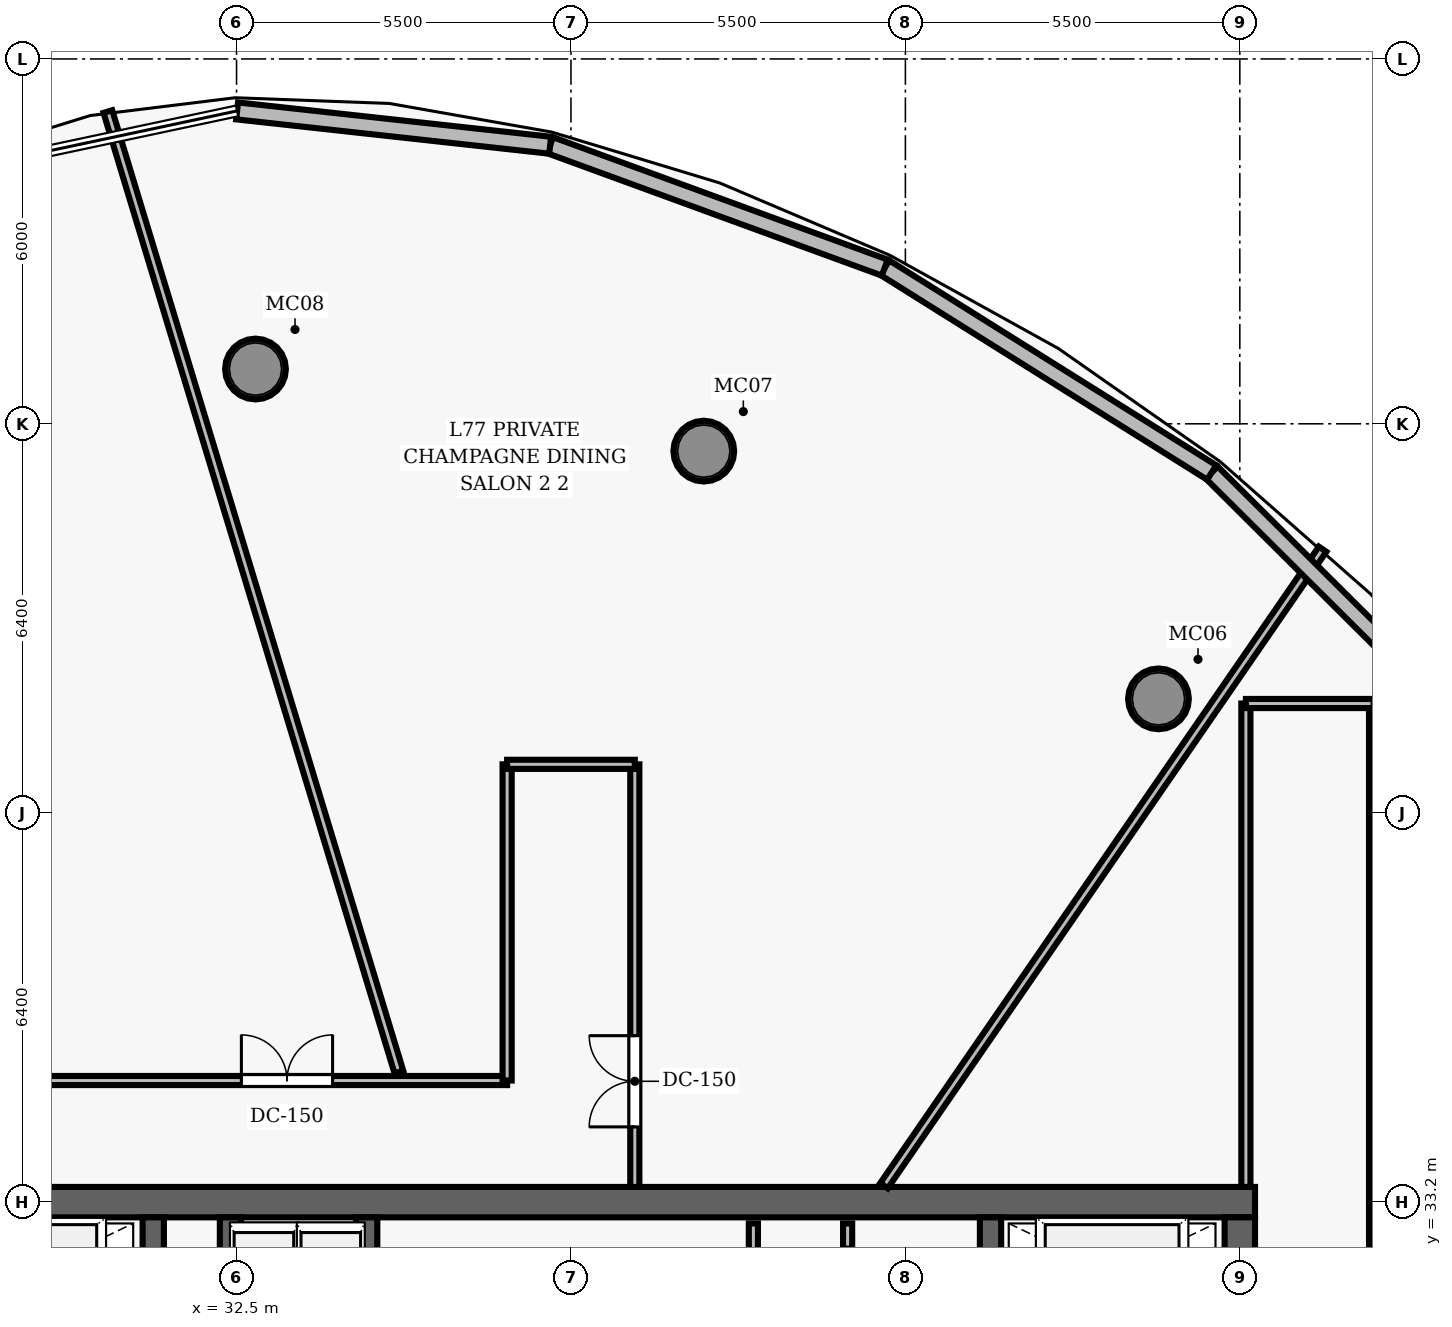
"""IFC4 building model, lengths in metres.
Left out: names, types, materials, properties, quantities, classifications, styles, units other than length and angle.
Written with IfcOpenShell. Run it as: python <this file> out.ifc"""

import sys

from ifc_helpers import new_model, si_unit, direction, frame, frame_2d, origin, origin_2d, place, context, subcontext, project, spatial, rectangle, hollow_circle, extrude, element, fill, save


model = new_model("IFC4")
c1 = context("Model", 3, precision=1e-05, world=origin(), true_north=direction((0.0, 1.0)))
c2 = subcontext(c1, "Body", "Model", "MODEL_VIEW")
j1 = project(units=[si_unit("LENGTHUNIT", "METRE"), si_unit("PLANEANGLEUNIT", "RADIAN")], contexts=[c1])
p1 = place(None, origin())
s1 = spatial("IfcSite", under=j1, at=p1, CompositionType="ELEMENT")
p2 = place(p1, origin())
s2 = spatial("IfcBuilding", under=s1, at=p2, CompositionType="ELEMENT")
p3 = place(p2, frame((0.0, 0.0, 303.65)))
s3 = spatial("IfcBuildingStorey", under=s2, at=p3, CompositionType="ELEMENT", Elevation=303.65)
p4 = place(p3, frame((26.75, 33.2, 0.0), z_axis=(0.0, 0.0, 1.0), x_axis=(1.0, 0.0, 0.0)))
e1 = element("IfcWall", 1, at=p4, inside=s3, PredefinedType="SHEAR", context=c2, shape_type="SweptSolid", body=[
    extrude(rectangle(XDim=22.5, YDim=0.5, at=frame_2d((11.25, 0.0))), origin(), (0.0, 0.0, 1.0), 3.85),
])
p5 = place(p3, frame((49.0, 19.05, 0.0), z_axis=(0.0, 0.0, 1.0), x_axis=(0.0, 1.0, 0.0)))
e2 = element("IfcWall", 2, at=p5, inside=s3, PredefinedType="SHEAR", context=c2, shape_type="SweptSolid", body=[
    extrude(rectangle(XDim=13.9, YDim=0.5, at=frame_2d((6.95, 0.0))), origin(), (0.0, 0.0, 1.0), 3.85),
])
p6 = place(p5, frame((8.2, 0.0, 0.0)))
e3 = element("IfcOpeningElement", 3, at=p6, cuts=e2, PredefinedType="OPENING", context=c2, shape_type="SweptSolid", body=[
    extrude(rectangle(XDim=1.05, YDim=2.15, at=frame_2d((0.525, 1.075))), frame((0.0, 0.26, 0.0), z_axis=(0.0, -1.0, 0.0), x_axis=(1.0, 0.0, 0.0)), (0.0, 0.0, 1.0), 0.52),
])
for number, where, z_axis, x_axis in (
    (4, (31.13, 19.05, 0.0), (0.0, 0.0, 1.0), (0.0, 1.0, 0.0)),
    (5, (44.9, 19.05, 0.0), (0.0, 0.0, 1.0), (0.0, 1.0, 0.0)),
):
    element("IfcWall", number, at=place(p3, frame(where, z_axis=z_axis, x_axis=x_axis)), inside=s3, PredefinedType="SHEAR", context=c2, shape_type="SweptSolid", body=[
        extrude(rectangle(XDim=13.9, YDim=0.35, at=frame_2d((6.95, 0.0))), origin(), (0.0, 0.0, 1.0), 3.85),
    ])
for number, where, z_axis, x_axis in (
    (6, (47.662, 41.477, 0.0), (0.0, 0.0, 1.0), (1.0, 0.0, 0.0)),
    (7, (40.185, 45.551, 0.0), (0.0, 0.0, 1.0), (1.0, 0.0, 0.0)),
    (8, (32.812, 46.901, 0.0), (0.0, 0.0, 1.0), (1.0, 0.0, 0.0)),
):
    element("IfcColumn", number, at=place(p3, frame(where, z_axis=z_axis, x_axis=x_axis)), inside=s3, PredefinedType="COLUMN", context=c2, shape_type="SweptSolid", body=[
        extrude(hollow_circle(Radius=0.5, WallThickness=0.045, at=origin_2d()), origin(), (0.0, 0.0, 1.0), 3.85),
    ])
p7 = place(p3, frame((34.64, 26.69, 0.0), z_axis=(0.0, 0.0, 1.0), x_axis=(0.0, 1.0, 0.0)))
e9 = element("IfcWall", 9, at=p7, inside=s3, PredefinedType="SHEAR", context=c2, shape_type="SweptSolid", body=[
    extrude(rectangle(XDim=6.26, YDim=0.35, at=frame_2d((3.13, 0.0))), origin(), (0.0, 0.0, 1.0), 3.85),
])
p8 = place(p7, frame((0.85, 0.0, 0.0)))
e10 = element("IfcOpeningElement", 10, at=p8, cuts=e9, PredefinedType="OPENING", context=c2, shape_type="SweptSolid", body=[
    extrude(rectangle(XDim=1.05, YDim=2.15, at=frame_2d((0.525, 1.075))), frame((0.0, 0.185, 0.0), z_axis=(0.0, -1.0, 0.0), x_axis=(1.0, 0.0, 0.0)), (0.0, 0.0, 1.0), 0.37),
])
p9 = place(p3, frame((32.4, 30.22, 0.0), z_axis=(0.0, 0.0, 1.0), x_axis=(0.0, 1.0, 0.0)))
e11 = element("IfcWall", 11, at=p9, inside=s3, PredefinedType="SHEAR", context=c2, shape_type="SweptSolid", body=[
    extrude(rectangle(XDim=2.73, YDim=0.35, at=frame_2d((1.365, 0.0))), origin(), (0.0, 0.0, 1.0), 3.015),
])
p10 = place(p3, frame((41.0, 28.95, 0.0), z_axis=(0.0, 0.0, 1.0), x_axis=(0.0, 1.0, 0.0)))
e12 = element("IfcWall", 12, at=p10, inside=s3, PredefinedType="PARTITIONING", context=c2, shape_type="SweptSolid", body=[
    extrude(rectangle(XDim=3.9, YDim=0.15, at=frame_2d((1.95, 0.0))), origin(), (0.0, 0.0, 1.0), 3.015),
])
p11 = place(p10, frame((0.7, 0.0, 0.0)))
e13 = element("IfcOpeningElement", 13, at=p11, cuts=e12, PredefinedType="OPENING", context=c2, shape_type="SweptSolid", body=[
    extrude(rectangle(XDim=0.85, YDim=2.1, at=frame_2d((0.425, 1.05))), frame((0.0, 0.085, 0.0), z_axis=(0.0, -1.0, 0.0), x_axis=(1.0, 0.0, 0.0)), (0.0, 0.0, 1.0), 0.17),
])
p12 = place(p3, frame((42.55, 28.1, 0.0), z_axis=(0.0, 0.0, 1.0), x_axis=(0.0, 1.0, 0.0)))
e14 = element("IfcWall", 14, at=p12, inside=s3, PredefinedType="PARTITIONING", context=c2, shape_type="SweptSolid", body=[
    extrude(rectangle(XDim=4.75, YDim=0.15, at=frame_2d((2.375, 0.0))), origin(), (0.0, 0.0, 1.0), 3.015),
])
p13 = place(p12, frame((0.35, 0.0, 0.0)))
e15 = element("IfcOpeningElement", 15, at=p13, cuts=e14, PredefinedType="OPENING", context=c2, shape_type="SweptSolid", body=[
    extrude(rectangle(XDim=0.85, YDim=2.1, at=frame_2d((0.425, 1.05))), frame((0.0, 0.085, 0.0), z_axis=(0.0, -1.0, 0.0), x_axis=(1.0, 0.0, 0.0)), (0.0, 0.0, 1.0), 0.17),
])
p14 = place(p12, frame((1.93, 0.0, 0.0)))
e16 = element("IfcOpeningElement", 16, at=p14, cuts=e14, PredefinedType="OPENING", context=c2, shape_type="SweptSolid", body=[
    extrude(rectangle(XDim=0.85, YDim=2.1, at=frame_2d((0.425, 1.05))), frame((0.0, 0.085, 0.0), z_axis=(0.0, -1.0, 0.0), x_axis=(1.0, 0.0, 0.0)), (0.0, 0.0, 1.0), 0.17),
])
p15 = place(p12, frame((3.51, 0.0, 0.0)))
e17 = element("IfcOpeningElement", 17, at=p15, cuts=e14, PredefinedType="OPENING", context=c2, shape_type="SweptSolid", body=[
    extrude(rectangle(XDim=0.85, YDim=2.1, at=frame_2d((0.425, 1.05))), frame((0.0, 0.085, 0.0), z_axis=(0.0, -1.0, 0.0), x_axis=(1.0, 0.0, 0.0)), (0.0, 0.0, 1.0), 0.17),
])
p16 = place(p3, frame((26.9, 35.2, 0.0), z_axis=(0.0, 0.0, 1.0), x_axis=(1.0, 0.0, 0.0)))
e18 = element("IfcWall", 18, at=p16, inside=s3, PredefinedType="PARTITIONING", context=c2, shape_type="SweptSolid", body=[
    extrude(rectangle(XDim=10.05, YDim=0.15, at=frame_2d((5.025, 0.0))), origin(), (0.0, 0.0, 1.0), 3.015),
])
p17 = place(p16, frame((5.679, 0.0, 0.0)))
e19 = element("IfcOpeningElement", 19, at=p17, cuts=e18, PredefinedType="OPENING", context=c2, shape_type="SweptSolid", body=[
    extrude(rectangle(XDim=1.5, YDim=2.2, at=frame_2d((0.75, 1.1))), frame((0.0, 0.085, 0.0), z_axis=(0.0, -1.0, 0.0), x_axis=(1.0, 0.0, 0.0)), (0.0, 0.0, 1.0), 0.17),
])
p18 = place(p3, frame((51.2, 10.6, 0.0), z_axis=(0.0, 0.0, 1.0), x_axis=(0.0, 1.0, 0.0)))
e20 = element("IfcWall", 20, at=p18, inside=s3, PredefinedType="PARTITIONING", context=c2, shape_type="SweptSolid", body=[
    extrude(rectangle(XDim=30.8, YDim=0.15, at=frame_2d((15.4, 0.0))), origin(), (0.0, 0.0, 1.0), 3.015),
])
p19 = place(p18, frame((18.976, 0.0, 0.0)))
e21 = element("IfcOpeningElement", 21, at=p19, cuts=e20, PredefinedType="OPENING", context=c2, shape_type="SweptSolid", body=[
    extrude(rectangle(XDim=1.5, YDim=2.2, at=frame_2d((0.75, 1.1))), frame((0.0, 0.085, 0.0), z_axis=(0.0, -1.0, 0.0), x_axis=(1.0, 0.0, 0.0)), (0.0, 0.0, 1.0), 0.17),
])
p20 = place(p18, frame((12.135, 0.0, 0.0)))
e22 = element("IfcOpeningElement", 22, at=p20, cuts=e20, PredefinedType="OPENING", context=c2, shape_type="SweptSolid", body=[
    extrude(rectangle(XDim=0.95, YDim=2.15, at=frame_2d((0.475, 1.075))), frame((0.0, 0.085, 0.0), z_axis=(0.0, -1.0, 0.0), x_axis=(1.0, 0.0, 0.0)), (0.0, 0.0, 1.0), 0.17),
])
p21 = place(p3, frame((49.1, 33.45, 0.0), z_axis=(0.0, 0.0, 1.0), x_axis=(0.0, 1.0, 0.0)))
e23 = element("IfcWall", 23, at=p21, inside=s3, PredefinedType="PARTITIONING", context=c2, shape_type="SweptSolid", body=[
    extrude(rectangle(XDim=7.95, YDim=0.15, at=frame_2d((3.975, 0.0))), origin(), (0.0, 0.0, 1.0), 3.015),
])
p22 = place(p3, frame((49.1, 41.4, 0.0), z_axis=(0.0, 0.0, 1.0), x_axis=(1.0, 0.0, 0.0)))
e24 = element("IfcWall", 24, at=p22, inside=s3, PredefinedType="PARTITIONING", context=c2, shape_type="SweptSolid", body=[
    extrude(rectangle(XDim=2.1, YDim=0.15, at=frame_2d((1.05, 0.0))), origin(), (0.0, 0.0, 1.0), 3.015),
])
p23 = place(p3, frame((36.95, 35.2, 0.0), z_axis=(0.0, 0.0, 1.0), x_axis=(0.0, 1.0, 0.0)))
e25 = element("IfcWall", 25, at=p23, inside=s3, PredefinedType="PARTITIONING", context=c2, shape_type="SweptSolid", body=[
    extrude(rectangle(XDim=5.2, YDim=0.15, at=frame_2d((2.6, 0.0))), origin(), (0.0, 0.0, 1.0), 3.015),
])
p24 = place(p3, frame((39.05, 33.45, 0.0), z_axis=(0.0, 0.0, 1.0), x_axis=(0.0, 1.0, 0.0)))
e26 = element("IfcWall", 26, at=p24, inside=s3, PredefinedType="PARTITIONING", context=c2, shape_type="SweptSolid", body=[
    extrude(rectangle(XDim=6.95, YDim=0.15, at=frame_2d((3.475, 0.0))), origin(), (0.0, 0.0, 1.0), 3.015),
])
p25 = place(p24, frame((0.988, 0.0, 0.0)))
e27 = element("IfcOpeningElement", 27, at=p25, cuts=e26, PredefinedType="OPENING", context=c2, shape_type="SweptSolid", body=[
    extrude(rectangle(XDim=1.5, YDim=2.2, at=frame_2d((0.75, 1.1))), frame((0.0, 0.085, 0.0), z_axis=(0.0, -1.0, 0.0), x_axis=(1.0, 0.0, 0.0)), (0.0, 0.0, 1.0), 0.17),
])
p26 = place(p3, frame((36.95, 40.4, 0.0), z_axis=(0.0, 0.0, 1.0), x_axis=(1.0, 0.0, 0.0)))
e28 = element("IfcWall", 28, at=p26, inside=s3, PredefinedType="PARTITIONING", context=c2, shape_type="SweptSolid", body=[
    extrude(rectangle(XDim=2.1, YDim=0.15, at=frame_2d((1.05, 0.0))), origin(), (0.0, 0.0, 1.0), 3.015),
])
p27 = place(p3, frame((43.148, 33.47, 0.0), z_axis=(0.0, 0.0, 1.0), x_axis=(0.567425051225, 0.823425048952, 0.0)))
e29 = element("IfcWall", 29, at=p27, inside=s3, PredefinedType="PARTITIONING", context=c2, shape_type="SweptSolid", body=[
    extrude(rectangle(XDim=12.712, YDim=0.15, at=frame_2d((6.356, 0.0))), origin(), (0.0, 0.0, 1.0), 3.015),
])
p28 = place(p3, frame((35.17, 35.34, 0.0), z_axis=(0.0, 0.0, 1.0), x_axis=(-0.289986456141, 0.957030749378, 0.0)))
e30 = element("IfcWall", 30, at=p28, inside=s3, PredefinedType="PARTITIONING", context=c2, shape_type="SweptSolid", body=[
    extrude(rectangle(XDim=16.504, YDim=0.15, at=frame_2d((8.252, 0.0))), origin(), (0.0, 0.0, 1.0), 3.015),
])
p29 = place(p3, frame((48.538, 45.199, 0.0), z_axis=(0.0, 0.0, 1.0), x_axis=(0.709049371212, -0.705158839683, 0.0)))
e31 = element("IfcWall", 31, at=p29, inside=s3, PredefinedType="SOLIDWALL", context=c2, shape_type="SweptSolid", body=[
    extrude(rectangle(XDim=6.526, YDim=0.28, at=frame_2d((3.263, 0.0))), origin(), (0.0, 0.0, 1.0), 3.6),
])
p30 = place(p3, frame((43.161, 48.568, 0.0), z_axis=(0.0, 0.0, 1.0), x_axis=(0.847381664832, -0.530984288003, 0.0)))
e32 = element("IfcWall", 32, at=p30, inside=s3, PredefinedType="SOLIDWALL", context=c2, shape_type="SweptSolid", body=[
    extrude(rectangle(XDim=6.345, YDim=0.28, at=frame_2d((3.172, 0.0))), origin(), (0.0, 0.0, 1.0), 3.6),
])
p31 = place(p3, frame((37.657, 50.581, 0.0), z_axis=(0.0, 0.0, 1.0), x_axis=(0.939137277683, -0.343542098828, 0.0)))
e33 = element("IfcWall", 33, at=p31, inside=s3, PredefinedType="SOLIDWALL", context=c2, shape_type="SweptSolid", body=[
    extrude(rectangle(XDim=5.86, YDim=0.28, at=frame_2d((2.93, 0.0))), origin(), (0.0, 0.0, 1.0), 3.6),
])
p32 = place(p3, frame((32.509, 51.146, 0.0), z_axis=(0.0, 0.0, 1.0), x_axis=(0.994048183695, -0.10894130756, 0.0)))
e34 = element("IfcWall", 34, at=p32, inside=s3, PredefinedType="SOLIDWALL", context=c2, shape_type="SweptSolid", body=[
    extrude(rectangle(XDim=5.179, YDim=0.28, at=frame_2d((2.589, 0.0))), origin(), (0.0, 0.0, 1.0), 3.6),
])
p33 = place(p15, origin())
e35 = element("IfcDoor", 35, at=p33, inside=s3, OperationType="SINGLE_SWING_LEFT", PredefinedType="DOOR", context=c2, shape_type="SweptSolid", body=[
    extrude(rectangle(XDim=0.85, YDim=2.1, at=frame_2d((0.425, 1.05))), frame((0.0, 0.025, 0.0), z_axis=(0.0, -1.0, 0.0), x_axis=(1.0, 0.0, 0.0)), (0.0, 0.0, 1.0), 0.05),
])
fill(e17, e35)
p34 = place(p25, origin())
e36 = element("IfcDoor", 36, at=p34, inside=s3, OperationType="DOUBLE_DOOR_SINGLE_SWING", PredefinedType="DOOR", context=c2, shape_type="SweptSolid", body=[
    extrude(rectangle(XDim=1.5, YDim=2.2, at=frame_2d((0.75, 1.1))), frame((0.0, 0.025, 0.0), z_axis=(0.0, -1.0, 0.0), x_axis=(1.0, 0.0, 0.0)), (0.0, 0.0, 1.0), 0.05),
])
fill(e27, e36)
p35 = place(p17, origin())
e37 = element("IfcDoor", 37, at=p35, inside=s3, OperationType="DOUBLE_DOOR_SINGLE_SWING", PredefinedType="DOOR", context=c2, shape_type="SweptSolid", body=[
    extrude(rectangle(XDim=1.5, YDim=2.2, at=frame_2d((0.75, 1.1))), frame((0.0, 0.025, 0.0), z_axis=(0.0, -1.0, 0.0), x_axis=(1.0, 0.0, 0.0)), (0.0, 0.0, 1.0), 0.05),
])
fill(e19, e37)
save(model, sys.argv[1])
